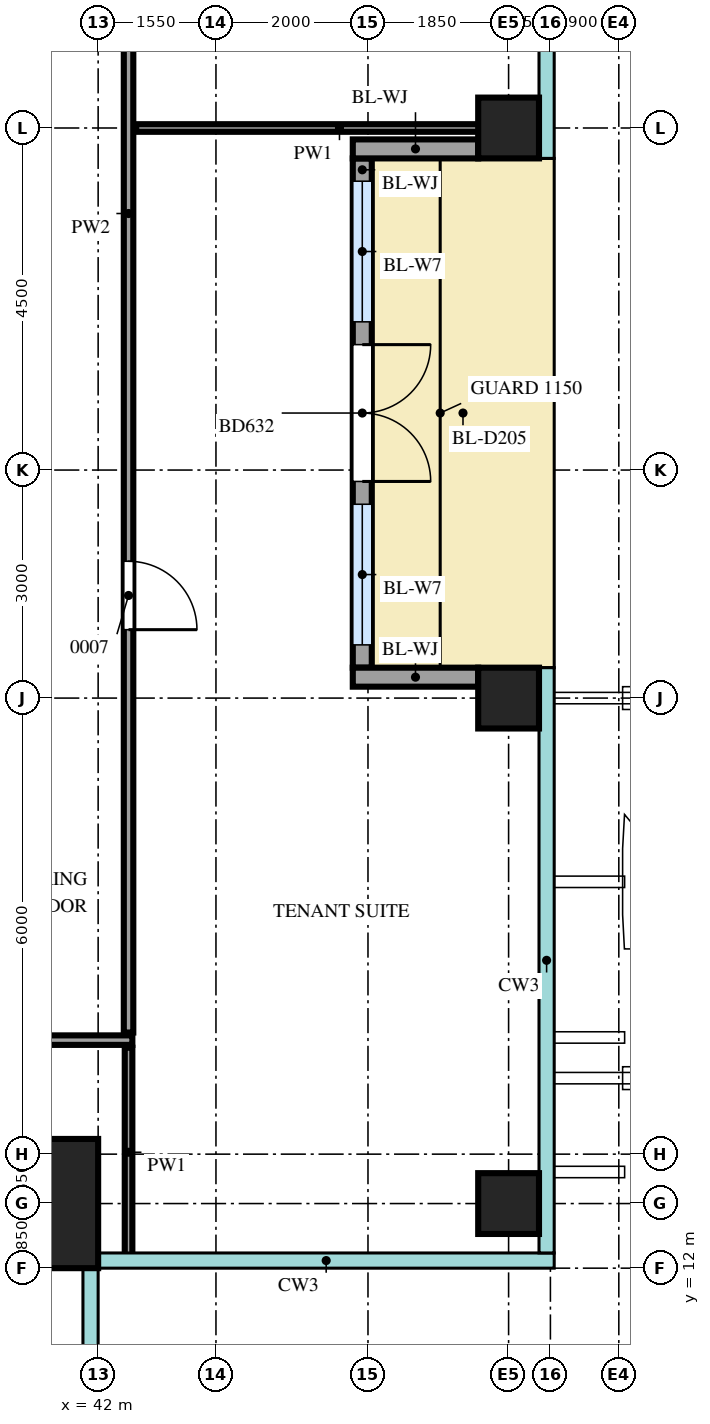
"""IFC4 building model, lengths in metres.
Left out: names, types, materials, properties, quantities, classifications, styles, units other than length and angle.
Written with IfcOpenShell. Run it as: python <this file> out.ifc"""

import sys

from ifc_helpers import new_model, si_unit, direction, frame, frame_2d, origin, origin_2d, place, context, subcontext, project, spatial, rectangle, extrude, source, transform, mapped, element, fill, save


model = new_model("IFC4")
c1 = context("Model", 3, precision=1e-05, world=origin(), true_north=direction((0.0, 1.0)))
c2 = subcontext(c1, "Body", "Model", "MODEL_VIEW")
j1 = project(units=[si_unit("LENGTHUNIT", "METRE"), si_unit("PLANEANGLEUNIT", "RADIAN")], contexts=[c1])
p1 = place(None, origin())
s1 = spatial("IfcSite", under=j1, at=p1, CompositionType="ELEMENT")
p2 = place(p1, origin())
s2 = spatial("IfcBuilding", under=s1, at=p2, CompositionType="ELEMENT")
p3 = place(p2, frame((0.0, 0.0, 282.2)))
s3 = spatial("IfcBuildingStorey", under=s2, at=p3, CompositionType="ELEMENT", Elevation=282.2)
m1 = source(origin(), c2, "Body", "SweptSolid", [
    extrude(rectangle(XDim=1.7, YDim=1.7, at=origin_2d()), origin(), (0.0, 0.0, 1.0), 3.75),
])
p4 = place(p3, frame((41.15, 12.85, 0.0), z_axis=(0.0, 0.0, 1.0), x_axis=(1.0, 0.0, 0.0)))
e1 = element("IfcColumn", 1, at=p4, inside=s3, PredefinedType="COLUMN", context=c2, shape_type="MappedRepresentation", body=[
    mapped(m1, transform((0.0, 0.0, 0.0))),
])
m2 = source(origin(), c2, "Body", "SweptSolid", [
    extrude(rectangle(XDim=0.8, YDim=0.8, at=origin_2d()), origin(), (0.0, 0.0, 1.0), 3.75),
])
for number, where, z_axis, x_axis in (
    (2, (47.4, 12.85, 0.0), (0.0, 0.0, 1.0), (1.0, 0.0, 0.0)),
    (3, (47.4, 19.5, 0.0), (0.0, 0.0, 1.0), (1.0, 0.0, 0.0)),
    (4, (47.4, 27.0, 0.0), (0.0, 0.0, 1.0), (1.0, 0.0, 0.0)),
):
    element("IfcColumn", number, at=place(p3, frame(where, z_axis=z_axis, x_axis=x_axis)), inside=s3, PredefinedType="COLUMN", context=c2, shape_type="MappedRepresentation", body=[
        mapped(m2, transform((0.0, 0.0, 0.0))),
    ])
m3 = source(origin(), c2, "Body", "SweptSolid", [
    extrude(rectangle(XDim=6.7, YDim=0.25, at=frame_2d((3.35, 0.0))), origin(), (0.0, 0.0, 1.0), 3.2),
])
p5 = place(p3, frame((45.475, 19.9, 0.0), z_axis=(0.0, 0.0, 1.0), x_axis=(0.0, 1.0, 0.0)))
e5 = element("IfcWall", 5, at=p5, inside=s3, PredefinedType="SOLIDWALL", context=c2, shape_type="MappedRepresentation", body=[
    mapped(m3, transform((0.0, 0.0, 0.0))),
])
m4 = source(origin(), c2, "Body", "SweptSolid", [
    extrude(rectangle(XDim=1.85, YDim=2.4, at=frame_2d((0.925, 1.2))), frame((0.0, 0.135, 0.0), z_axis=(0.0, -1.0, 0.0), x_axis=(1.0, 0.0, 0.0)), (0.0, 0.0, 1.0), 0.27),
])
p6 = place(p5, frame((0.3, 0.0, 0.0)))
e6 = element("IfcOpeningElement", 6, at=p6, cuts=e5, PredefinedType="OPENING", context=c2, shape_type="MappedRepresentation", body=[
    mapped(m4, transform((0.0, 0.0, 0.0))),
])
p7 = place(p5, frame((4.55, 0.0, 0.0)))
e7 = element("IfcOpeningElement", 7, at=p7, cuts=e5, PredefinedType="OPENING", context=c2, shape_type="MappedRepresentation", body=[
    mapped(m4, transform((0.0, 0.0, 0.0))),
])
m5 = source(origin(), c2, "Body", "SweptSolid", [
    extrude(rectangle(XDim=1.8, YDim=2.4, at=frame_2d((0.9, 1.2))), frame((0.0, 0.135, 0.0), z_axis=(0.0, -1.0, 0.0), x_axis=(1.0, 0.0, 0.0)), (0.0, 0.0, 1.0), 0.27),
])
p8 = place(p5, frame((2.45, 0.0, 0.0)))
e8 = element("IfcOpeningElement", 8, at=p8, cuts=e5, PredefinedType="OPENING", context=c2, shape_type="MappedRepresentation", body=[
    mapped(m5, transform((0.0, 0.0, 0.0))),
])
m6 = source(origin(), c2, "Body", "SweptSolid", [
    extrude(rectangle(XDim=1.65, YDim=0.25, at=frame_2d((0.825, 0.0))), origin(), (0.0, 0.0, 1.0), 3.2),
])
for number, where, z_axis, x_axis in (
    (9, (47.0, 19.775, 0.0), (0.0, 0.0, 1.0), (-1.0, 0.0, 0.0)),
    (10, (47.0, 26.725, 0.0), (0.0, 0.0, 1.0), (-1.0, 0.0, 0.0)),
):
    element("IfcWall", number, at=place(p3, frame(where, z_axis=z_axis, x_axis=x_axis)), inside=s3, PredefinedType="SOLIDWALL", context=c2, shape_type="MappedRepresentation", body=[
        mapped(m6, transform((0.0, 0.0, 0.0))),
    ])
m7 = source(origin(), c2, "Body", "SweptSolid", [
    extrude(rectangle(XDim=2.75, YDim=0.1, at=frame_2d((1.375, 0.0))), origin(), (0.0, 0.0, 1.0), 3.8),
])
p9 = place(p3, frame((42.4, 12.15, 0.0), z_axis=(0.0, 0.0, 1.0), x_axis=(0.0, 1.0, 0.0)))
e11 = element("IfcWall", 11, at=p9, inside=s3, PredefinedType="PARTITIONING", context=c2, shape_type="MappedRepresentation", body=[
    mapped(m7, transform((0.0, 0.0, 0.0))),
])
m8 = source(origin(), c2, "Body", "SweptSolid", [
    extrude(rectangle(XDim=19.1, YDim=0.125, at=frame_2d((9.55, 0.0))), origin(), (0.0, 0.0, 1.0), 3.8),
])
p10 = place(p3, frame((23.35, 15.0, 0.0), z_axis=(0.0, 0.0, 1.0), x_axis=(1.0, 0.0, 0.0)))
e12 = element("IfcWall", 12, at=p10, inside=s3, PredefinedType="PARTITIONING", context=c2, shape_type="MappedRepresentation", body=[
    mapped(m8, transform((0.0, 0.0, 0.0))),
])
m9 = source(origin(), c2, "Body", "SweptSolid", [
    extrude(rectangle(XDim=0.9, YDim=2.1, at=frame_2d((0.45, 1.05))), frame((0.0, 0.073, 0.0), z_axis=(0.0, -1.0, 0.0), x_axis=(1.0, 0.0, 0.0)), (0.0, 0.0, 1.0), 0.145),
])
p11 = place(p10, frame((7.1, 0.0, 0.0)))
e13 = element("IfcOpeningElement", 13, at=p11, cuts=e12, PredefinedType="OPENING", context=c2, shape_type="MappedRepresentation", body=[
    mapped(m9, transform((0.0, 0.0, 0.0))),
])
p12 = place(p10, frame((13.3, 0.0, 0.0)))
e14 = element("IfcOpeningElement", 14, at=p12, cuts=e12, PredefinedType="OPENING", context=c2, shape_type="MappedRepresentation", body=[
    mapped(m9, transform((0.0, 0.0, 0.0))),
])
m10 = source(origin(), c2, "Body", "SweptSolid", [
    extrude(rectangle(XDim=23.8, YDim=0.125, at=frame_2d((11.9, 0.0))), origin(), (0.0, 0.0, 1.0), 3.8),
])
p13 = place(p3, frame((42.4, 15.1, 0.0), z_axis=(0.0, 0.0, 1.0), x_axis=(0.0, 1.0, 0.0)))
e15 = element("IfcWall", 15, at=p13, inside=s3, PredefinedType="PARTITIONING", context=c2, shape_type="MappedRepresentation", body=[
    mapped(m10, transform((0.0, 0.0, 0.0))),
])
p14 = place(p13, frame((5.3, 0.0, 0.0)))
e16 = element("IfcOpeningElement", 16, at=p14, cuts=e15, PredefinedType="OPENING", context=c2, shape_type="MappedRepresentation", body=[
    mapped(m9, transform((0.0, 0.0, 0.0))),
])
p15 = place(p13, frame((15.35, 0.0, 0.0)))
e17 = element("IfcOpeningElement", 17, at=p15, cuts=e15, PredefinedType="OPENING", context=c2, shape_type="MappedRepresentation", body=[
    mapped(m9, transform((0.0, 0.0, 0.0))),
])
p16 = place(p13, frame((21.05, 0.0, 0.0)))
e18 = element("IfcOpeningElement", 18, at=p16, cuts=e15, PredefinedType="OPENING", context=c2, shape_type="MappedRepresentation", body=[
    mapped(m9, transform((0.0, 0.0, 0.0))),
])
m11 = source(origin(), c2, "Body", "SweptSolid", [
    extrude(rectangle(XDim=5.35, YDim=0.1, at=frame_2d((2.675, 0.0))), origin(), (0.0, 0.0, 1.0), 3.8),
])
p17 = place(p3, frame((42.5, 27.0, 0.0), z_axis=(0.0, 0.0, 1.0), x_axis=(1.0, 0.0, 0.0)))
e19 = element("IfcWall", 19, at=p17, inside=s3, PredefinedType="PARTITIONING", context=c2, shape_type="MappedRepresentation", body=[
    mapped(m11, transform((0.0, 0.0, 0.0))),
])
m12 = source(origin(), c2, "Body", "SweptSolid", [
    extrude(rectangle(XDim=1.85, YDim=2.4, at=frame_2d((0.925, 1.2))), frame((0.0, 0.03, 0.0), z_axis=(0.0, -1.0, 0.0), x_axis=(1.0, 0.0, 0.0)), (0.0, 0.0, 1.0), 0.06),
])
p18 = place(p6, origin())
e20 = element("IfcWindow", 20, at=p18, inside=s3, PartitioningType="SINGLE_PANEL", PredefinedType="WINDOW", context=c2, shape_type="MappedRepresentation", body=[
    mapped(m12, transform((0.0, 0.0, 0.0))),
])
fill(e6, e20)
p19 = place(p7, origin())
e21 = element("IfcWindow", 21, at=p19, inside=s3, PartitioningType="SINGLE_PANEL", PredefinedType="WINDOW", context=c2, shape_type="MappedRepresentation", body=[
    mapped(m12, transform((0.0, 0.0, 0.0))),
])
fill(e7, e21)
m13 = source(origin(), c2, "Body", "SweptSolid", [
    extrude(rectangle(XDim=1.8, YDim=2.4, at=frame_2d((0.9, 1.2))), frame((0.0, 0.025, 0.0), z_axis=(0.0, -1.0, 0.0), x_axis=(1.0, 0.0, 0.0)), (0.0, 0.0, 1.0), 0.05),
])
p20 = place(p8, origin())
e22 = element("IfcDoor", 22, at=p20, inside=s3, OperationType="DOUBLE_DOOR_DOUBLE_SWING", PredefinedType="DOOR", context=c2, shape_type="MappedRepresentation", body=[
    mapped(m13, transform((0.0, 0.0, 0.0))),
])
fill(e8, e22)
m14 = source(origin(), c2, "Body", "SweptSolid", [
    extrude(rectangle(XDim=0.9, YDim=2.1, at=frame_2d((0.45, 1.05))), frame((0.0, 0.025, 0.0), z_axis=(0.0, -1.0, 0.0), x_axis=(1.0, 0.0, 0.0)), (0.0, 0.0, 1.0), 0.05),
])
p21 = place(p14, origin())
e23 = element("IfcDoor", 23, at=p21, inside=s3, OperationType="SINGLE_SWING_LEFT", PredefinedType="DOOR", context=c2, shape_type="MappedRepresentation", body=[
    mapped(m14, transform((0.0, 0.0, 0.0))),
])
fill(e16, e23)
save(model, sys.argv[1])
